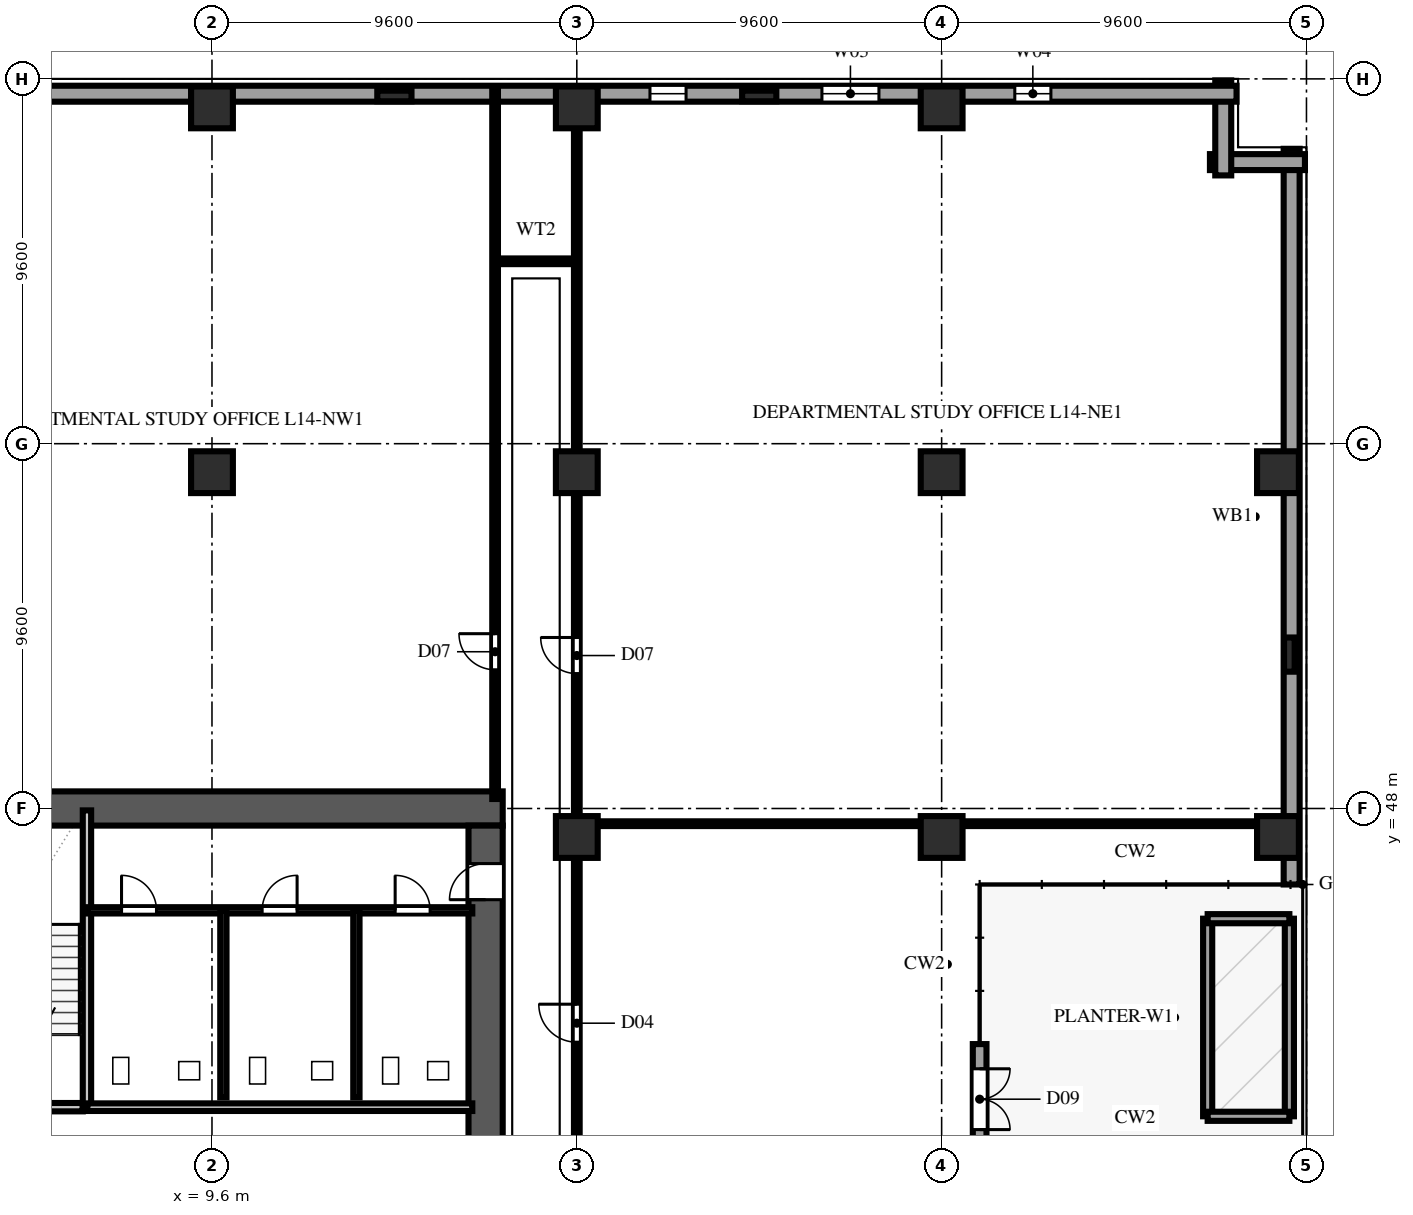
"""IFC4 building model, lengths in metres.
Left out: names, types, materials, properties, quantities, classifications, styles, units other than length and angle.
Written with IfcOpenShell. Run it as: python <this file> out.ifc"""

import sys

from ifc_helpers import new_model, si_unit, direction, frame, frame_2d, origin, origin_2d, place, context, subcontext, project, spatial, rectangle, extrude, element, fill, save


model = new_model("IFC4")
c1 = context("Model", 3, precision=1e-05, world=origin(), true_north=direction((0.0, 1.0)))
c2 = subcontext(c1, "Body", "Model", "MODEL_VIEW")
j1 = project(units=[si_unit("LENGTHUNIT", "METRE"), si_unit("PLANEANGLEUNIT", "RADIAN")], contexts=[c1])
p1 = place(None, origin())
s1 = spatial("IfcSite", under=j1, at=p1, CompositionType="ELEMENT")
p2 = place(p1, origin())
s2 = spatial("IfcBuilding", under=s1, at=p2, CompositionType="ELEMENT")
p3 = place(p2, frame((0.0, 0.0, 58.4)))
s3 = spatial("IfcBuildingStorey", under=s2, at=p3, CompositionType="ELEMENT", Elevation=58.4)
p4 = place(p3, frame((2.65, 48.0, 0.0), z_axis=(0.0, 0.0, 1.0), x_axis=(1.0, 0.0, 0.0)))
e1 = element("IfcWall", 1, at=p4, inside=s3, PredefinedType="SHEAR", context=c2, shape_type="SweptSolid", body=[
    extrude(rectangle(XDim=14.6, YDim=0.9, at=frame_2d((7.3, 0.0))), origin(), (0.0, 0.0, 1.0), 3.54),
])
p5 = place(p3, frame((16.8, 36.4, 0.0), z_axis=(0.0, 0.0, 1.0), x_axis=(0.0, 1.0, 0.0)))
e2 = element("IfcWall", 2, at=p5, inside=s3, PredefinedType="SHEAR", context=c2, shape_type="SweptSolid", body=[
    extrude(rectangle(XDim=11.15, YDim=0.9, at=frame_2d((5.575, 0.0))), origin(), (0.0, 0.0, 1.0), 3.54),
])
p6 = place(p5, frame((9.2, 0.0, 0.0)))
e3 = element("IfcOpeningElement", 3, at=p6, cuts=e2, PredefinedType="OPENING", context=c2, shape_type="SweptSolid", body=[
    extrude(rectangle(XDim=0.95, YDim=2.15, at=frame_2d((0.475, 1.075))), frame((0.0, 0.462, 0.0), z_axis=(0.0, -1.0, 0.0), x_axis=(1.0, 0.0, 0.0)), (0.0, 0.0, 1.0), 0.924),
])
for number, where, z_axis, x_axis in (
    (4, (9.6, 56.85, 0.0), (0.0, 0.0, 1.0), (1.0, 0.0, 0.0)),
    (5, (9.6, 66.45, 0.0), (0.0, 0.0, 1.0), (1.0, 0.0, 0.0)),
    (6, (19.2, 47.25, 0.0), (0.0, 0.0, 1.0), (1.0, 0.0, 0.0)),
    (7, (19.2, 56.85, 0.0), (0.0, 0.0, 1.0), (1.0, 0.0, 0.0)),
    (8, (19.2, 66.45, 0.0), (0.0, 0.0, 1.0), (1.0, 0.0, 0.0)),
    (9, (28.8, 47.25, 0.0), (0.0, 0.0, 1.0), (1.0, 0.0, 0.0)),
    (10, (28.8, 56.85, 0.0), (0.0, 0.0, 1.0), (1.0, 0.0, 0.0)),
    (11, (28.8, 66.45, 0.0), (0.0, 0.0, 1.0), (1.0, 0.0, 0.0)),
    (12, (37.65, 47.25, 0.0), (0.0, 0.0, 1.0), (1.0, 0.0, 0.0)),
    (13, (37.65, 56.85, 0.0), (0.0, 0.0, 1.0), (1.0, 0.0, 0.0)),
):
    element("IfcColumn", number, at=place(p3, frame(where, z_axis=z_axis, x_axis=x_axis)), inside=s3, PredefinedType="COLUMN", context=c2, shape_type="SweptSolid", body=[
        extrude(rectangle(XDim=1.1, YDim=1.1, at=origin_2d()), origin(), (0.0, 0.0, 1.0), 3.8),
    ])
for number, where, z_axis, x_axis in (
    (14, (14.4, 66.75, 0.0), (0.0, 0.0, 1.0), (1.0, 0.0, 0.0)),
    (15, (24.0, 66.75, 0.0), (0.0, 0.0, 1.0), (1.0, 0.0, 0.0)),
    (16, (37.95, 52.05, 0.0), (0.0, 0.0, 1.0), (0.0, 1.0, 0.0)),
):
    element("IfcColumn", number, at=place(p3, frame(where, z_axis=z_axis, x_axis=x_axis)), inside=s3, PredefinedType="PILASTER", context=c2, shape_type="SweptSolid", body=[
        extrude(rectangle(XDim=0.9, YDim=0.28, at=origin_2d()), origin(), (0.0, 0.0, 1.0), 3.8),
    ])
p7 = place(p3, frame((38.01, 46.0, 0.0), z_axis=(0.0, 0.0, 1.0), x_axis=(0.0, 1.0, 0.0)))
e17 = element("IfcWall", 17, at=p7, inside=s3, PredefinedType="SOLIDWALL", context=c2, shape_type="SweptSolid", body=[
    extrude(rectangle(XDim=19.36, YDim=0.42, at=frame_2d((9.68, 0.0))), origin(), (0.0, 0.0, 1.0), 3.54),
])
for number, where, z_axis, x_axis in (
    (18, (38.36, 65.01, 0.0), (0.0, 0.0, 1.0), (-1.0, 0.0, 0.0)),
    (19, (36.21, 64.66, 0.0), (0.0, 0.0, 1.0), (0.0, 1.0, 0.0)),
):
    element("IfcWall", number, at=place(p3, frame(where, z_axis=z_axis, x_axis=x_axis)), inside=s3, PredefinedType="SOLIDWALL", context=c2, shape_type="SweptSolid", body=[
        extrude(rectangle(XDim=2.5, YDim=0.42, at=frame_2d((1.25, 0.0))), origin(), (0.0, 0.0, 1.0), 3.54),
    ])
p8 = place(p3, frame((36.56, 66.81, 0.0), z_axis=(0.0, 0.0, 1.0), x_axis=(-1.0, 0.0, 0.0)))
e20 = element("IfcWall", 20, at=p8, inside=s3, PredefinedType="SOLIDWALL", context=c2, shape_type="SweptSolid", body=[
    extrude(rectangle(XDim=34.72, YDim=0.42, at=frame_2d((17.36, 0.0))), origin(), (0.0, 0.0, 1.0), 3.54),
])
p9 = place(p8, frame((4.885, 0.0, 0.9)))
e21 = element("IfcOpeningElement", 21, at=p9, cuts=e20, PredefinedType="OPENING", context=c2, shape_type="SweptSolid", body=[
    extrude(rectangle(XDim=0.95, YDim=1.85, at=frame_2d((0.475, 0.925))), frame((0.0, 0.222, 0.0), z_axis=(0.0, -1.0, 0.0), x_axis=(1.0, 0.0, 0.0)), (0.0, 0.0, 1.0), 0.444),
])
p10 = place(p8, frame((9.41, 0.0, 0.9)))
e22 = element("IfcOpeningElement", 22, at=p10, cuts=e20, PredefinedType="OPENING", context=c2, shape_type="SweptSolid", body=[
    extrude(rectangle(XDim=1.5, YDim=1.85, at=frame_2d((0.75, 0.925))), frame((0.0, 0.222, 0.0), z_axis=(0.0, -1.0, 0.0), x_axis=(1.0, 0.0, 0.0)), (0.0, 0.0, 1.0), 0.444),
])
p11 = place(p8, frame((14.485, 0.0, 0.9)))
e23 = element("IfcOpeningElement", 23, at=p11, cuts=e20, PredefinedType="OPENING", context=c2, shape_type="SweptSolid", body=[
    extrude(rectangle(XDim=0.95, YDim=1.85, at=frame_2d((0.475, 0.925))), frame((0.0, 0.222, 0.0), z_axis=(0.0, -1.0, 0.0), x_axis=(1.0, 0.0, 0.0)), (0.0, 0.0, 1.0), 0.444),
])
p12 = place(p3, frame((29.8, 39.0, 0.0), z_axis=(0.0, 0.0, 1.0), x_axis=(0.0, 1.0, 0.0)))
e24 = element("IfcWall", 24, at=p12, inside=s3, PredefinedType="SOLIDWALL", context=c2, shape_type="SweptSolid", body=[
    extrude(rectangle(XDim=2.8, YDim=0.36, at=frame_2d((1.4, 0.0))), origin(), (0.0, 0.0, 1.0), 3.54),
])
p13 = place(p12, frame((0.55, 0.0, 0.0)))
e25 = element("IfcOpeningElement", 25, at=p13, cuts=e24, PredefinedType="OPENING", context=c2, shape_type="SweptSolid", body=[
    extrude(rectangle(XDim=1.6, YDim=2.3, at=frame_2d((0.8, 1.15))), frame((0.0, 0.192, 0.0), z_axis=(0.0, -1.0, 0.0), x_axis=(1.0, 0.0, 0.0)), (0.0, 0.0, 1.0), 0.384),
])
for number, where, z_axis, x_axis in (
    (26, (35.8, 39.9, 0.0), (0.0, 0.0, 1.0), (0.0, 1.0, 0.0)),
    (27, (37.95, 39.9, 0.0), (0.0, 0.0, 1.0), (0.0, 1.0, 0.0)),
):
    element("IfcWall", number, at=place(p3, frame(where, z_axis=z_axis, x_axis=x_axis)), inside=s3, PredefinedType="USERDEFINED", context=c2, shape_type="SweptSolid", body=[
        extrude(rectangle(XDim=5.2, YDim=0.24, at=frame_2d((2.6, 0.0))), origin(), (0.0, 0.0, 1.0), 0.62),
    ])
for number, where, z_axis, x_axis in (
    (28, (35.8, 39.9, 0.0), (0.0, 0.0, 1.0), (1.0, 0.0, 0.0)),
    (29, (35.8, 45.1, 0.0), (0.0, 0.0, 1.0), (1.0, 0.0, 0.0)),
):
    element("IfcWall", number, at=place(p3, frame(where, z_axis=z_axis, x_axis=x_axis)), inside=s3, PredefinedType="USERDEFINED", context=c2, shape_type="SweptSolid", body=[
        extrude(rectangle(XDim=2.15, YDim=0.24, at=frame_2d((1.075, 0.0))), origin(), (0.0, 0.0, 1.0), 0.62),
    ])
p14 = place(p3, frame((2.65, 40.14, 0.0), z_axis=(0.0, 0.0, 1.0), x_axis=(1.0, 0.0, 0.0)))
e30 = element("IfcWall", 30, at=p14, inside=s3, PredefinedType="SOLIDWALL", context=c2, shape_type="SweptSolid", body=[
    extrude(rectangle(XDim=3.55, YDim=0.22, at=frame_2d((1.775, 0.0))), origin(), (0.0, 0.0, 1.0), 3.54),
])
p15 = place(p14, frame((1.2, 0.0, 0.0)))
e31 = element("IfcOpeningElement", 31, at=p15, cuts=e30, PredefinedType="OPENING", context=c2, shape_type="SweptSolid", body=[
    extrude(rectangle(XDim=1.1, YDim=2.2, at=frame_2d((0.55, 1.1))), frame((0.0, 0.122, 0.0), z_axis=(0.0, -1.0, 0.0), x_axis=(1.0, 0.0, 0.0)), (0.0, 0.0, 1.0), 0.244),
])
p16 = place(p3, frame((6.31, 40.14, 0.0), z_axis=(0.0, 0.0, 1.0), x_axis=(0.0, 1.0, 0.0)))
e32 = element("IfcWall", 32, at=p16, inside=s3, PredefinedType="SOLIDWALL", context=c2, shape_type="SweptSolid", body=[
    extrude(rectangle(XDim=7.81, YDim=0.22, at=frame_2d((3.905, 0.0))), origin(), (0.0, 0.0, 1.0), 3.54),
])
p17 = place(p3, frame((6.32, 40.14, 0.0), z_axis=(0.0, 0.0, 1.0), x_axis=(1.0, 0.0, 0.0)))
e33 = element("IfcWall", 33, at=p17, inside=s3, PredefinedType="SOLIDWALL", context=c2, shape_type="SweptSolid", body=[
    extrude(rectangle(XDim=10.13, YDim=0.2, at=frame_2d((5.065, 0.0))), origin(), (0.0, 0.0, 1.0), 3.54),
])
p18 = place(p3, frame((6.32, 45.32, 0.0), z_axis=(0.0, 0.0, 1.0), x_axis=(1.0, 0.0, 0.0)))
e34 = element("IfcWall", 34, at=p18, inside=s3, PredefinedType="PLUMBINGWALL", context=c2, shape_type="SweptSolid", body=[
    extrude(rectangle(XDim=10.13, YDim=0.165, at=frame_2d((5.065, 0.0))), origin(), (0.0, 0.0, 1.0), 3.54),
])
p19 = place(p18, frame((0.9, 0.0, 0.0)))
e35 = element("IfcOpeningElement", 35, at=p19, cuts=e34, PredefinedType="OPENING", context=c2, shape_type="SweptSolid", body=[
    extrude(rectangle(XDim=0.92, YDim=2.15, at=frame_2d((0.46, 1.075))), frame((0.0, 0.094, 0.0), z_axis=(0.0, -1.0, 0.0), x_axis=(1.0, 0.0, 0.0)), (0.0, 0.0, 1.0), 0.189),
])
p20 = place(p18, frame((4.6, 0.0, 0.0)))
e36 = element("IfcOpeningElement", 36, at=p20, cuts=e34, PredefinedType="OPENING", context=c2, shape_type="SweptSolid", body=[
    extrude(rectangle(XDim=0.92, YDim=2.15, at=frame_2d((0.46, 1.075))), frame((0.0, 0.094, 0.0), z_axis=(0.0, -1.0, 0.0), x_axis=(1.0, 0.0, 0.0)), (0.0, 0.0, 1.0), 0.189),
])
p21 = place(p18, frame((8.1, 0.0, 0.0)))
e37 = element("IfcOpeningElement", 37, at=p21, cuts=e34, PredefinedType="OPENING", context=c2, shape_type="SweptSolid", body=[
    extrude(rectangle(XDim=0.92, YDim=2.15, at=frame_2d((0.46, 1.075))), frame((0.0, 0.094, 0.0), z_axis=(0.0, -1.0, 0.0), x_axis=(1.0, 0.0, 0.0)), (0.0, 0.0, 1.0), 0.189),
])
for number, where, z_axis, x_axis in (
    (38, (9.9, 40.4, 0.0), (0.0, 0.0, 1.0), (0.0, 1.0, 0.0)),
    (39, (13.4, 40.4, 0.0), (0.0, 0.0, 1.0), (0.0, 1.0, 0.0)),
):
    element("IfcWall", number, at=place(p3, frame(where, z_axis=z_axis, x_axis=x_axis)), inside=s3, PredefinedType="PLUMBINGWALL", context=c2, shape_type="SweptSolid", body=[
        extrude(rectangle(XDim=4.92, YDim=0.165, at=frame_2d((2.46, 0.0))), origin(), (0.0, 0.0, 1.0), 3.54),
    ])
p22 = place(p3, frame((17.05, 62.4, 0.0), z_axis=(0.0, 0.0, 1.0), x_axis=(1.0, 0.0, 0.0)))
e40 = element("IfcWall", 40, at=p22, inside=s3, PredefinedType="PARTITIONING", context=c2, shape_type="SweptSolid", body=[
    extrude(rectangle(XDim=2.15, YDim=0.15, at=frame_2d((1.075, 0.0))), origin(), (0.0, 0.0, 1.0), 3.54),
])
p23 = place(p3, frame((19.2, 26.25, 0.0), z_axis=(0.0, 0.0, 1.0), x_axis=(0.0, 1.0, 0.0)))
e41 = element("IfcWall", 41, at=p23, inside=s3, PredefinedType="PARTITIONING", context=c2, shape_type="SweptSolid", body=[
    extrude(rectangle(XDim=21.0, YDim=0.15, at=frame_2d((10.5, 0.0))), origin(), (0.0, 0.0, 1.0), 2.845),
])
p24 = place(p23, frame((15.6, 0.0, 0.0)))
e42 = element("IfcOpeningElement", 42, at=p24, cuts=e41, PredefinedType="OPENING", context=c2, shape_type="SweptSolid", body=[
    extrude(rectangle(XDim=1.0, YDim=2.2, at=frame_2d((0.5, 1.1))), frame((0.0, 0.087, 0.0), z_axis=(0.0, -1.0, 0.0), x_axis=(1.0, 0.0, 0.0)), (0.0, 0.0, 1.0), 0.174),
])
p25 = place(p3, frame((19.2, 47.25, 0.0), z_axis=(0.0, 0.0, 1.0), x_axis=(0.0, 1.0, 0.0)))
e43 = element("IfcWall", 43, at=p25, inside=s3, PredefinedType="PARTITIONING", context=c2, shape_type="SweptSolid", body=[
    extrude(rectangle(XDim=0.35, YDim=0.15, at=frame_2d((0.175, 0.0))), origin(), (0.0, 0.0, 1.0), 3.54),
])
p26 = place(p3, frame((19.2, 47.6, 0.0), z_axis=(0.0, 0.0, 1.0), x_axis=(1.0, 0.0, 0.0)))
e44 = element("IfcWall", 44, at=p26, inside=s3, PredefinedType="PARTITIONING", context=c2, shape_type="SweptSolid", body=[
    extrude(rectangle(XDim=18.98, YDim=0.125, at=frame_2d((9.49, 0.0))), origin(), (0.0, 0.0, 1.0), 3.54),
])
p27 = place(p3, frame((19.2, 47.6, 0.0), z_axis=(0.0, 0.0, 1.0), x_axis=(0.0, 1.0, 0.0)))
e45 = element("IfcWall", 45, at=p27, inside=s3, PredefinedType="PARTITIONING", context=c2, shape_type="SweptSolid", body=[
    extrude(rectangle(XDim=18.85, YDim=0.15, at=frame_2d((9.425, 0.0))), origin(), (0.0, 0.0, 1.0), 2.845),
])
p28 = place(p27, frame((3.95, 0.0, 0.0)))
e46 = element("IfcOpeningElement", 46, at=p28, cuts=e45, PredefinedType="OPENING", context=c2, shape_type="SweptSolid", body=[
    extrude(rectangle(XDim=0.95, YDim=2.15, at=frame_2d((0.475, 1.075))), frame((0.0, 0.087, 0.0), z_axis=(0.0, -1.0, 0.0), x_axis=(1.0, 0.0, 0.0)), (0.0, 0.0, 1.0), 0.174),
])
p29 = place(p3, frame((19.2, 66.45, 0.0), z_axis=(0.0, 0.0, 1.0), x_axis=(0.0, 1.0, 0.0)))
e47 = element("IfcWall", 47, at=p29, inside=s3, PredefinedType="PARTITIONING", context=c2, shape_type="SweptSolid", body=[
    extrude(rectangle(XDim=0.53, YDim=0.15, at=frame_2d((0.265, 0.0))), origin(), (0.0, 0.0, 1.0), 3.54),
])
p30 = place(p3, frame((17.05, 48.25, 0.0), z_axis=(0.0, 0.0, 1.0), x_axis=(0.0, 1.0, 0.0)))
e48 = element("IfcWall", 48, at=p30, inside=s3, PredefinedType="PARTITIONING", context=c2, shape_type="SweptSolid", body=[
    extrude(rectangle(XDim=18.73, YDim=0.15, at=frame_2d((9.365, 0.0))), origin(), (0.0, 0.0, 1.0), 3.54),
])
p31 = place(p30, frame((3.4, 0.0, 0.0)))
e49 = element("IfcOpeningElement", 49, at=p31, cuts=e48, PredefinedType="OPENING", context=c2, shape_type="SweptSolid", body=[
    extrude(rectangle(XDim=0.95, YDim=2.15, at=frame_2d((0.475, 1.075))), frame((0.0, 0.087, 0.0), z_axis=(0.0, -1.0, 0.0), x_axis=(1.0, 0.0, 0.0)), (0.0, 0.0, 1.0), 0.174),
])
p32 = place(p9, origin())
e50 = element("IfcWindow", 50, at=p32, inside=s3, PartitioningType="SINGLE_PANEL", PredefinedType="WINDOW", context=c2, shape_type="SweptSolid", body=[
    extrude(rectangle(XDim=0.95, YDim=1.85, at=frame_2d((0.475, 0.925))), frame((0.0, 0.11, 0.0), z_axis=(0.0, -1.0, 0.0), x_axis=(1.0, 0.0, 0.0)), (0.0, 0.0, 1.0), 0.06),
])
fill(e21, e50)
p33 = place(p10, origin())
e51 = element("IfcWindow", 51, at=p33, inside=s3, PartitioningType="DOUBLE_PANEL_VERTICAL", PredefinedType="WINDOW", context=c2, shape_type="SweptSolid", body=[
    extrude(rectangle(XDim=1.5, YDim=1.85, at=frame_2d((0.75, 0.925))), frame((0.0, 0.11, 0.0), z_axis=(0.0, -1.0, 0.0), x_axis=(1.0, 0.0, 0.0)), (0.0, 0.0, 1.0), 0.06),
])
fill(e22, e51)
p34 = place(p11, origin())
e52 = element("IfcWindow", 52, at=p34, inside=s3, PartitioningType="SINGLE_PANEL", PredefinedType="WINDOW", context=c2, shape_type="SweptSolid", body=[
    extrude(rectangle(XDim=0.95, YDim=1.85, at=frame_2d((0.475, 0.925))), frame((0.0, 0.11, 0.0), z_axis=(0.0, -1.0, 0.0), x_axis=(1.0, 0.0, 0.0)), (0.0, 0.0, 1.0), 0.06),
])
fill(e23, e52)
p35 = place(p13, frame((1.6, 0.0, 0.0), z_axis=(0.0, 0.0, 1.0), x_axis=(-1.0, 0.0, 0.0)))
e53 = element("IfcDoor", 53, at=p35, inside=s3, OperationType="DOUBLE_SWING_LEFT", PredefinedType="DOOR", context=c2, shape_type="SweptSolid", body=[
    extrude(rectangle(XDim=1.6, YDim=2.3, at=frame_2d((0.8, 1.15))), frame((0.0, 0.025, 0.0), z_axis=(0.0, -1.0, 0.0), x_axis=(1.0, 0.0, 0.0)), (0.0, 0.0, 1.0), 0.05),
])
fill(e25, e53)
p36 = place(p6, origin())
e54 = element("IfcDoor", 54, at=p36, inside=s3, OperationType="SINGLE_SWING_LEFT", PredefinedType="DOOR", context=c2, shape_type="SweptSolid", body=[
    extrude(rectangle(XDim=0.95, YDim=2.15, at=frame_2d((0.475, 1.075))), frame((0.0, 0.025, 0.0), z_axis=(0.0, -1.0, 0.0), x_axis=(1.0, 0.0, 0.0)), (0.0, 0.0, 1.0), 0.05),
])
fill(e3, e54)
p37 = place(p19, origin())
e55 = element("IfcDoor", 55, at=p37, inside=s3, OperationType="SINGLE_SWING_LEFT", PredefinedType="DOOR", context=c2, shape_type="SweptSolid", body=[
    extrude(rectangle(XDim=0.92, YDim=2.15, at=frame_2d((0.46, 1.075))), frame((0.0, 0.025, 0.0), z_axis=(0.0, -1.0, 0.0), x_axis=(1.0, 0.0, 0.0)), (0.0, 0.0, 1.0), 0.05),
])
fill(e35, e55)
p38 = place(p20, origin())
e56 = element("IfcDoor", 56, at=p38, inside=s3, OperationType="SINGLE_SWING_RIGHT", PredefinedType="DOOR", context=c2, shape_type="SweptSolid", body=[
    extrude(rectangle(XDim=0.92, YDim=2.15, at=frame_2d((0.46, 1.075))), frame((0.0, 0.025, 0.0), z_axis=(0.0, -1.0, 0.0), x_axis=(1.0, 0.0, 0.0)), (0.0, 0.0, 1.0), 0.05),
])
fill(e36, e56)
p39 = place(p21, origin())
e57 = element("IfcDoor", 57, at=p39, inside=s3, OperationType="SINGLE_SWING_LEFT", PredefinedType="DOOR", context=c2, shape_type="SweptSolid", body=[
    extrude(rectangle(XDim=0.92, YDim=2.15, at=frame_2d((0.46, 1.075))), frame((0.0, 0.025, 0.0), z_axis=(0.0, -1.0, 0.0), x_axis=(1.0, 0.0, 0.0)), (0.0, 0.0, 1.0), 0.05),
])
fill(e37, e57)
p40 = place(p24, origin())
e58 = element("IfcDoor", 58, at=p40, inside=s3, OperationType="SINGLE_SWING_RIGHT", PredefinedType="DOOR", context=c2, shape_type="SweptSolid", body=[
    extrude(rectangle(XDim=1.0, YDim=2.2, at=frame_2d((0.5, 1.1))), frame((0.0, 0.025, 0.0), z_axis=(0.0, -1.0, 0.0), x_axis=(1.0, 0.0, 0.0)), (0.0, 0.0, 1.0), 0.05),
])
fill(e42, e58)
p41 = place(p28, origin())
e59 = element("IfcDoor", 59, at=p41, inside=s3, OperationType="SINGLE_SWING_RIGHT", PredefinedType="DOOR", context=c2, shape_type="SweptSolid", body=[
    extrude(rectangle(XDim=0.95, YDim=2.15, at=frame_2d((0.475, 1.075))), frame((0.0, 0.025, 0.0), z_axis=(0.0, -1.0, 0.0), x_axis=(1.0, 0.0, 0.0)), (0.0, 0.0, 1.0), 0.05),
])
fill(e46, e59)
p42 = place(p31, origin())
e60 = element("IfcDoor", 60, at=p42, inside=s3, OperationType="SINGLE_SWING_RIGHT", PredefinedType="DOOR", context=c2, shape_type="SweptSolid", body=[
    extrude(rectangle(XDim=0.95, YDim=2.15, at=frame_2d((0.475, 1.075))), frame((0.0, 0.025, 0.0), z_axis=(0.0, -1.0, 0.0), x_axis=(1.0, 0.0, 0.0)), (0.0, 0.0, 1.0), 0.05),
])
fill(e49, e60)
save(model, sys.argv[1])
